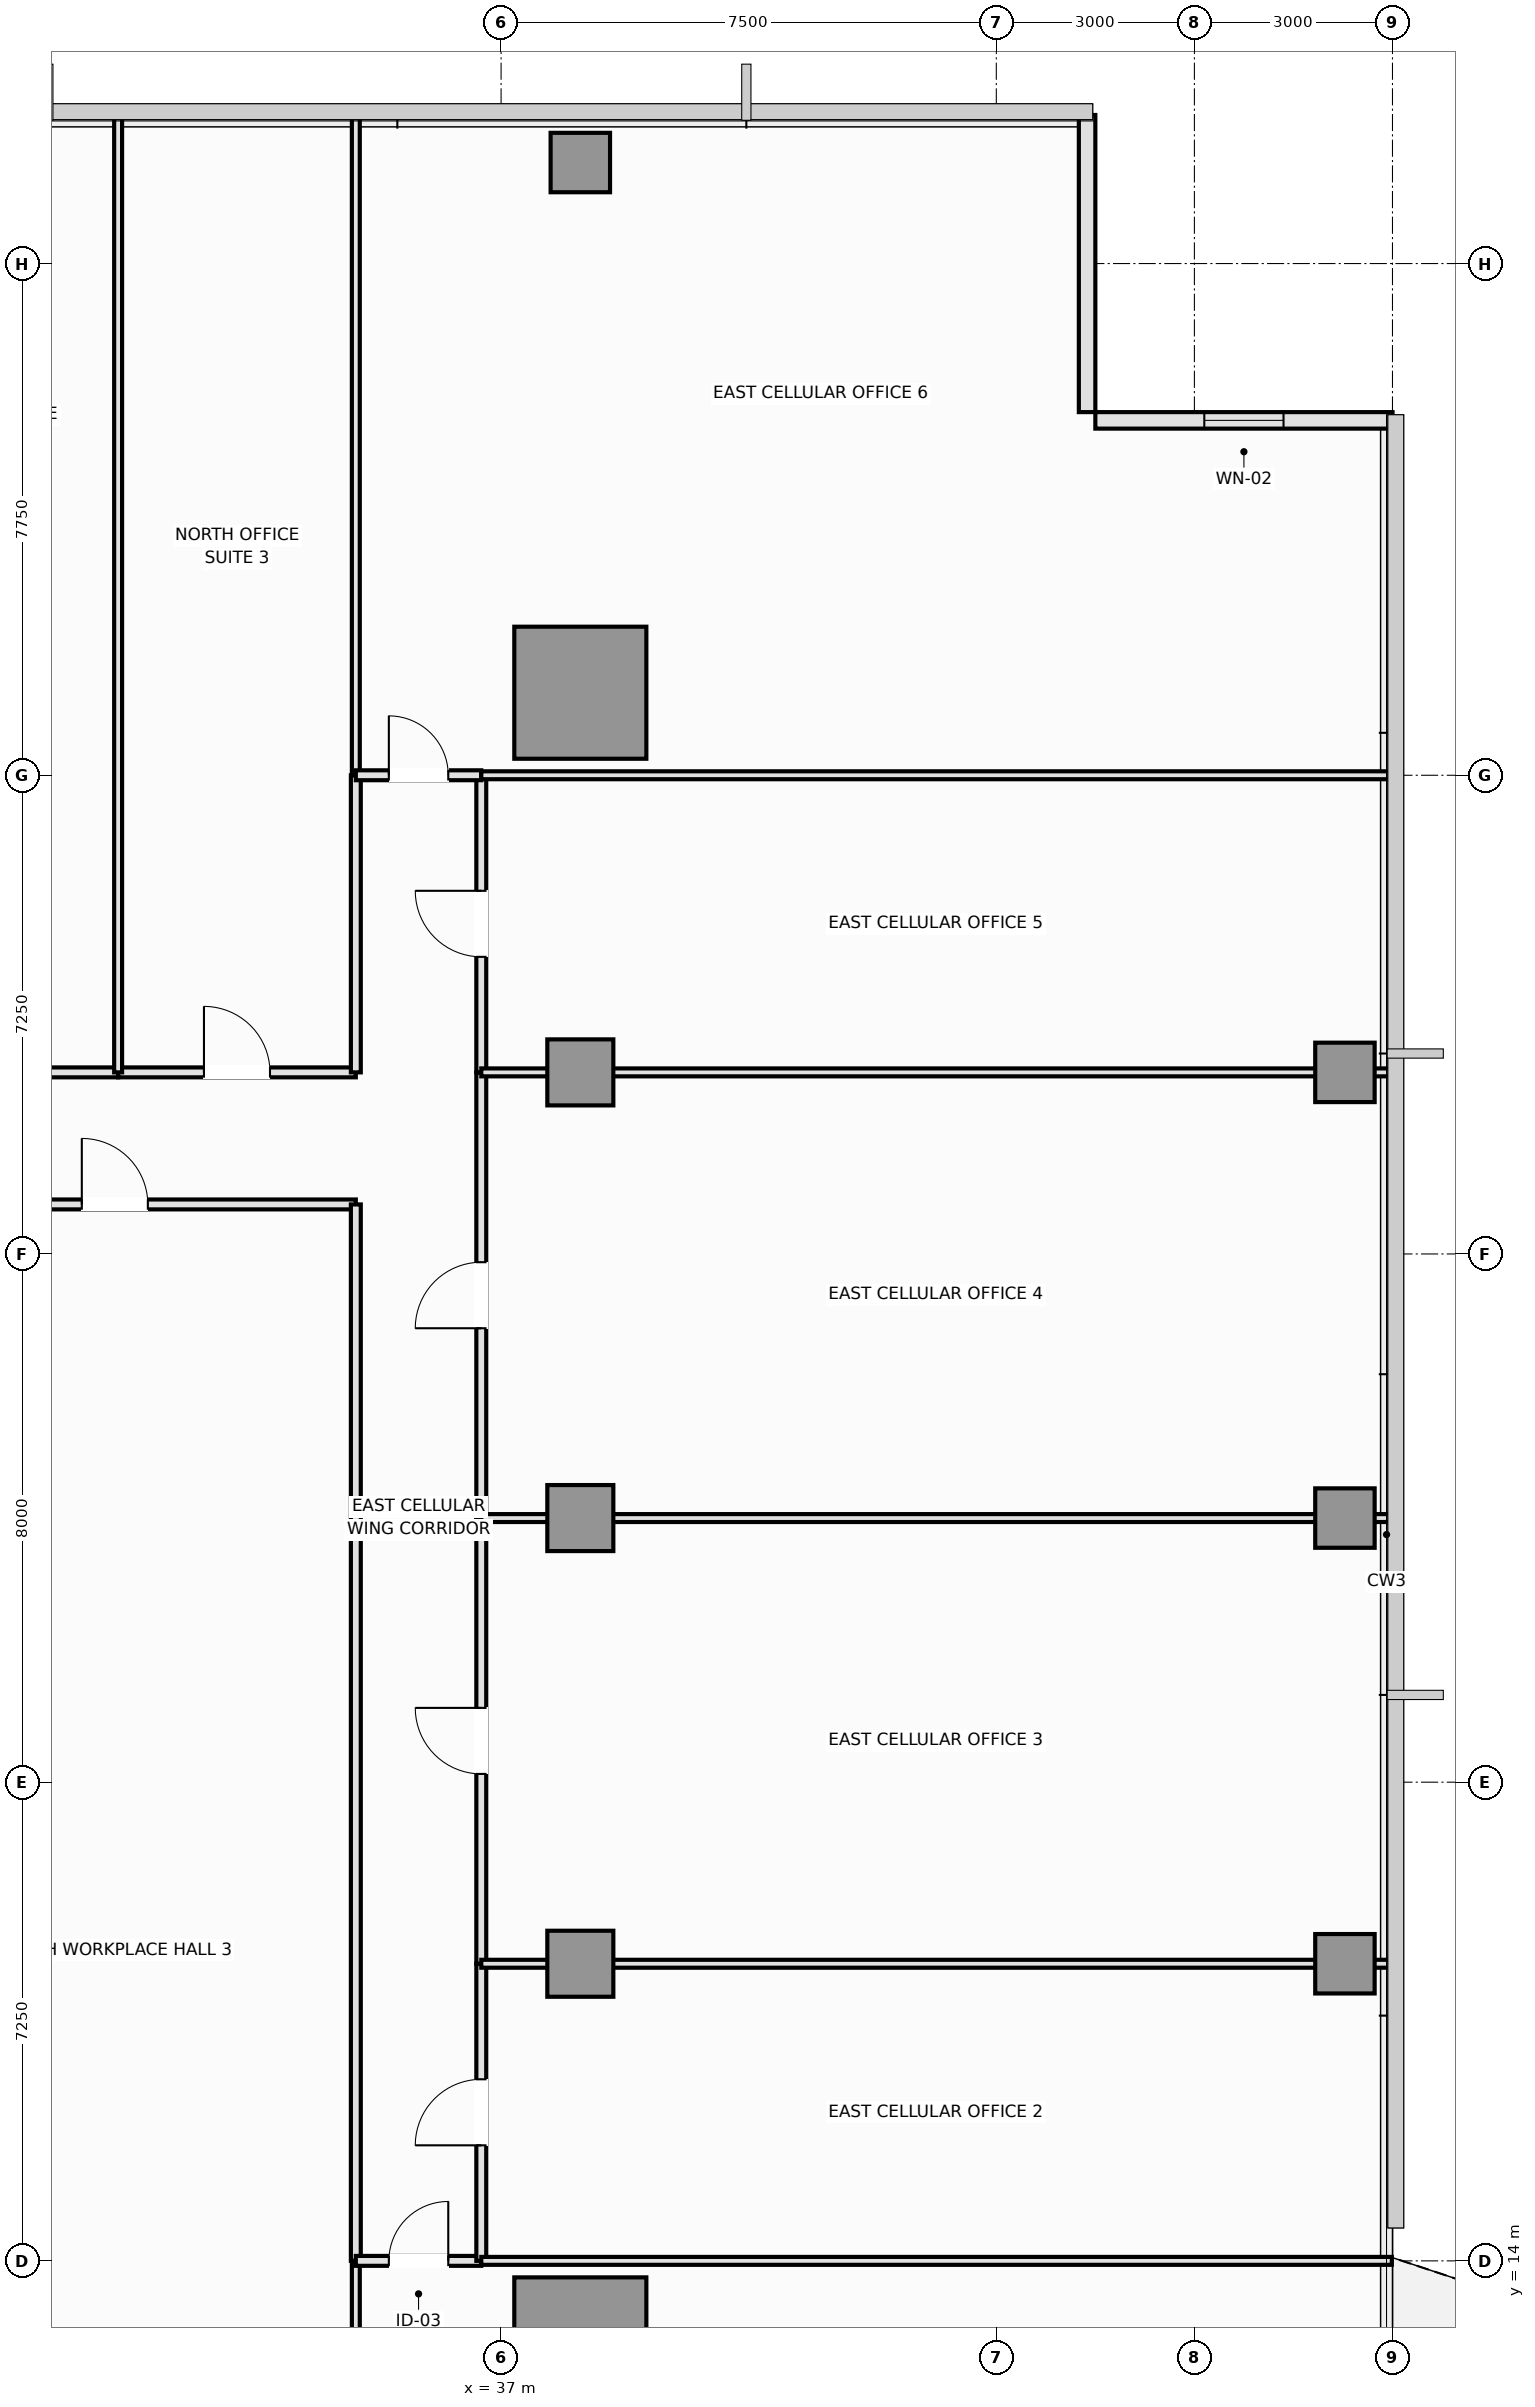
"""IFC4 building model, lengths in metres.
Left out: names, types, materials, properties, quantities, classifications, styles, units other than length and angle.
Written with IfcOpenShell. Run it as: python <this file> out.ifc"""

import sys

from ifc_helpers import new_model, si_unit, direction, frame, frame_2d, origin, origin_2d, place, context, subcontext, project, spatial, rectangle, extrude, element, fill, save


model = new_model("IFC4")
c1 = context("Model", 3, precision=1e-05, world=origin(), true_north=direction((0.0, 1.0)))
c2 = subcontext(c1, "Body", "Model", "MODEL_VIEW")
j1 = project(units=[si_unit("LENGTHUNIT", "METRE"), si_unit("PLANEANGLEUNIT", "RADIAN")], contexts=[c1])
p1 = place(None, origin())
s1 = spatial("IfcSite", under=j1, at=p1, CompositionType="ELEMENT")
p2 = place(p1, origin())
s2 = spatial("IfcBuilding", under=s1, at=p2, CompositionType="ELEMENT")
p3 = place(p2, frame((0.0, 0.0, 148.4)))
s3 = spatial("IfcBuildingStorey", under=s2, at=p3, CompositionType="ELEMENT", Elevation=148.4)
for number, where, z_axis, x_axis in (
    (1, (38.2, 12.75, 0.0), (0.0, 0.0, 1.0), (1.0, 0.0, 0.0)),
    (2, (38.2, 37.75, 0.0), (0.0, 0.0, 1.0), (1.0, 0.0, 0.0)),
):
    element("IfcColumn", number, at=place(p3, frame(where, z_axis=z_axis, x_axis=x_axis)), inside=s3, PredefinedType="COLUMN", context=c2, shape_type="SweptSolid", body=[
        extrude(rectangle(XDim=2.0, YDim=2.0, at=origin_2d()), origin(), (0.0, 0.0, 1.0), 3.55),
    ])
for number, where, z_axis, x_axis in (
    (3, (38.2, 18.5, 0.0), (0.0, 0.0, 1.0), (1.0, 0.0, 0.0)),
    (4, (38.2, 25.25, 0.0), (0.0, 0.0, 1.0), (1.0, 0.0, 0.0)),
    (5, (38.2, 32.0, 0.0), (0.0, 0.0, 1.0), (1.0, 0.0, 0.0)),
):
    element("IfcColumn", number, at=place(p3, frame(where, z_axis=z_axis, x_axis=x_axis)), inside=s3, PredefinedType="COLUMN", context=c2, shape_type="SweptSolid", body=[
        extrude(rectangle(XDim=1.0, YDim=1.0, at=origin_2d()), origin(), (0.0, 0.0, 1.0), 3.55),
    ])
for number, where, z_axis, x_axis in (
    (6, (49.78, 18.5, 0.0), (0.0, 0.0, 1.0), (1.0, 0.0, 0.0)),
    (7, (49.78, 25.25, 0.0), (0.0, 0.0, 1.0), (1.0, 0.0, 0.0)),
    (8, (49.78, 32.0, 0.0), (0.0, 0.0, 1.0), (1.0, 0.0, 0.0)),
    (9, (38.2, 45.78, 0.0), (0.0, 0.0, 1.0), (1.0, 0.0, 0.0)),
):
    element("IfcColumn", number, at=place(p3, frame(where, z_axis=z_axis, x_axis=x_axis)), inside=s3, PredefinedType="COLUMN", context=c2, shape_type="SweptSolid", body=[
        extrude(rectangle(XDim=0.9, YDim=0.9, at=origin_2d()), origin(), (0.0, 0.0, 1.0), 3.55),
    ])
p4 = place(p3, frame((50.5, 41.875, 0.0), z_axis=(0.0, 0.0, 1.0), x_axis=(-1.0, 0.0, 0.0)))
e10 = element("IfcWall", 10, at=p4, inside=s3, PredefinedType="SOLIDWALL", context=c2, shape_type="SweptSolid", body=[
    extrude(rectangle(XDim=4.5, YDim=0.25, at=frame_2d((2.25, 0.0))), origin(), (0.0, 0.0, 1.0), 3.37),
])
p5 = place(p4, frame((1.65, 0.0, 0.9)))
e11 = element("IfcOpeningElement", 11, at=p5, cuts=e10, PredefinedType="OPENING", context=c2, shape_type="SweptSolid", body=[
    extrude(rectangle(XDim=1.2, YDim=1.8, at=frame_2d((0.6, 0.9))), frame((0.0, 0.135, 0.0), z_axis=(0.0, -1.0, 0.0), x_axis=(1.0, 0.0, 0.0)), (0.0, 0.0, 1.0), 0.27),
])
p6 = place(p3, frame((45.875, 42.0, 0.0), z_axis=(0.0, 0.0, 1.0), x_axis=(0.0, 1.0, 0.0)))
e12 = element("IfcWall", 12, at=p6, inside=s3, PredefinedType="SOLIDWALL", context=c2, shape_type="SweptSolid", body=[
    extrude(rectangle(XDim=4.5, YDim=0.25, at=frame_2d((2.25, 0.0))), origin(), (0.0, 0.0, 1.0), 3.37),
])
p7 = place(p3, frame((27.5, 30.0, 0.0), z_axis=(0.0, 0.0, 1.0), x_axis=(1.0, 0.0, 0.0)))
e13 = element("IfcWall", 13, at=p7, inside=s3, PredefinedType="PARTITIONING", context=c2, shape_type="SweptSolid", body=[
    extrude(rectangle(XDim=7.3, YDim=0.15, at=frame_2d((3.65, 0.0))), origin(), (0.0, 0.0, 1.0), 3.37),
])
p8 = place(p7, frame((3.15, 0.0, 0.0)))
e14 = element("IfcOpeningElement", 14, at=p8, cuts=e13, PredefinedType="OPENING", context=c2, shape_type="SweptSolid", body=[
    extrude(rectangle(XDim=1.0, YDim=2.15, at=frame_2d((0.5, 1.075))), frame((0.0, 0.085, 0.0), z_axis=(0.0, -1.0, 0.0), x_axis=(1.0, 0.0, 0.0)), (0.0, 0.0, 1.0), 0.17),
])
p9 = place(p3, frame((27.5, 32.0, 0.0), z_axis=(0.0, 0.0, 1.0), x_axis=(1.0, 0.0, 0.0)))
e15 = element("IfcWall", 15, at=p9, inside=s3, PredefinedType="PARTITIONING", context=c2, shape_type="SweptSolid", body=[
    extrude(rectangle(XDim=3.7, YDim=0.15, at=frame_2d((1.85, 0.0))), origin(), (0.0, 0.0, 1.0), 2.77),
])
p10 = place(p9, frame((1.35, 0.0, 0.0)))
e16 = element("IfcOpeningElement", 16, at=p10, cuts=e15, PredefinedType="OPENING", context=c2, shape_type="SweptSolid", body=[
    extrude(rectangle(XDim=1.0, YDim=2.15, at=frame_2d((0.5, 1.075))), frame((0.0, 0.085, 0.0), z_axis=(0.0, -1.0, 0.0), x_axis=(1.0, 0.0, 0.0)), (0.0, 0.0, 1.0), 0.17),
])
p11 = place(p3, frame((31.2, 32.0, 0.0), z_axis=(0.0, 0.0, 1.0), x_axis=(1.0, 0.0, 0.0)))
e17 = element("IfcWall", 17, at=p11, inside=s3, PredefinedType="PARTITIONING", context=c2, shape_type="SweptSolid", body=[
    extrude(rectangle(XDim=3.6, YDim=0.15, at=frame_2d((1.8, 0.0))), origin(), (0.0, 0.0, 1.0), 2.77),
])
p12 = place(p11, frame((1.3, 0.0, 0.0)))
e18 = element("IfcOpeningElement", 18, at=p12, cuts=e17, PredefinedType="OPENING", context=c2, shape_type="SweptSolid", body=[
    extrude(rectangle(XDim=1.0, YDim=2.15, at=frame_2d((0.5, 1.075))), frame((0.0, 0.085, 0.0), z_axis=(0.0, -1.0, 0.0), x_axis=(1.0, 0.0, 0.0)), (0.0, 0.0, 1.0), 0.17),
])
p13 = place(p3, frame((34.8, 14.0, 0.0), z_axis=(0.0, 0.0, 1.0), x_axis=(0.0, 1.0, 0.0)))
e19 = element("IfcWall", 19, at=p13, inside=s3, PredefinedType="PARTITIONING", context=c2, shape_type="SweptSolid", body=[
    extrude(rectangle(XDim=16.0, YDim=0.15, at=frame_2d((8.0, 0.0))), origin(), (0.0, 0.0, 1.0), 3.37),
])
p14 = place(p3, frame((34.8, 3.51, 0.0), z_axis=(0.0, 0.0, 1.0), x_axis=(0.0, 1.0, 0.0)))
e20 = element("IfcWall", 20, at=p14, inside=s3, PredefinedType="PARTITIONING", context=c2, shape_type="SweptSolid", body=[
    extrude(rectangle(XDim=10.49, YDim=0.12, at=frame_2d((5.245, 0.0))), origin(), (0.0, 0.0, 1.0), 3.37),
])
p15 = place(p3, frame((31.2, 32.0, 0.0), z_axis=(0.0, 0.0, 1.0), x_axis=(0.0, 1.0, 0.0)))
e21 = element("IfcWall", 21, at=p15, inside=s3, PredefinedType="PARTITIONING", context=c2, shape_type="SweptSolid", body=[
    extrude(rectangle(XDim=14.49, YDim=0.12, at=frame_2d((7.245, 0.0))), origin(), (0.0, 0.0, 1.0), 3.37),
])
p16 = place(p3, frame((34.8, 32.0, 0.0), z_axis=(0.0, 0.0, 1.0), x_axis=(0.0, 1.0, 0.0)))
e22 = element("IfcWall", 22, at=p16, inside=s3, PredefinedType="PARTITIONING", context=c2, shape_type="SweptSolid", body=[
    extrude(rectangle(XDim=4.5, YDim=0.15, at=frame_2d((2.25, 0.0))), origin(), (0.0, 0.0, 1.0), 3.37),
])
p17 = place(p3, frame((34.8, 36.5, 0.0), z_axis=(0.0, 0.0, 1.0), x_axis=(0.0, 1.0, 0.0)))
e23 = element("IfcWall", 23, at=p17, inside=s3, PredefinedType="PARTITIONING", context=c2, shape_type="SweptSolid", body=[
    extrude(rectangle(XDim=9.99, YDim=0.12, at=frame_2d((4.995, 0.0))), origin(), (0.0, 0.0, 1.0), 3.37),
])
p18 = place(p3, frame((34.8, 14.0, 0.0), z_axis=(0.0, 0.0, 1.0), x_axis=(1.0, 0.0, 0.0)))
e24 = element("IfcWall", 24, at=p18, inside=s3, PredefinedType="PARTITIONING", context=c2, shape_type="SweptSolid", body=[
    extrude(rectangle(XDim=1.9, YDim=0.15, at=frame_2d((0.95, 0.0))), origin(), (0.0, 0.0, 1.0), 3.37),
])
p19 = place(p18, frame((0.5, 0.0, 0.0)))
e25 = element("IfcOpeningElement", 25, at=p19, cuts=e24, PredefinedType="OPENING", context=c2, shape_type="SweptSolid", body=[
    extrude(rectangle(XDim=0.9, YDim=2.1, at=frame_2d((0.45, 1.05))), frame((0.0, 0.085, 0.0), z_axis=(0.0, -1.0, 0.0), x_axis=(1.0, 0.0, 0.0)), (0.0, 0.0, 1.0), 0.17),
])
p20 = place(p3, frame((36.7, 14.0, 0.0), z_axis=(0.0, 0.0, 1.0), x_axis=(0.0, 1.0, 0.0)))
e26 = element("IfcWall", 26, at=p20, inside=s3, PredefinedType="PARTITIONING", context=c2, shape_type="SweptSolid", body=[
    extrude(rectangle(XDim=4.5, YDim=0.15, at=frame_2d((2.25, 0.0))), origin(), (0.0, 0.0, 1.0), 3.37),
])
p21 = place(p20, frame((1.75, 0.0, 0.0)))
e27 = element("IfcOpeningElement", 27, at=p21, cuts=e26, PredefinedType="OPENING", context=c2, shape_type="SweptSolid", body=[
    extrude(rectangle(XDim=1.0, YDim=2.15, at=frame_2d((0.5, 1.075))), frame((0.0, 0.085, 0.0), z_axis=(0.0, -1.0, 0.0), x_axis=(1.0, 0.0, 0.0)), (0.0, 0.0, 1.0), 0.17),
])
p22 = place(p3, frame((36.7, 18.5, 0.0), z_axis=(0.0, 0.0, 1.0), x_axis=(0.0, 1.0, 0.0)))
e28 = element("IfcWall", 28, at=p22, inside=s3, PredefinedType="PARTITIONING", context=c2, shape_type="SweptSolid", body=[
    extrude(rectangle(XDim=6.75, YDim=0.15, at=frame_2d((3.375, 0.0))), origin(), (0.0, 0.0, 1.0), 3.37),
])
p23 = place(p22, frame((2.875, 0.0, 0.0)))
e29 = element("IfcOpeningElement", 29, at=p23, cuts=e28, PredefinedType="OPENING", context=c2, shape_type="SweptSolid", body=[
    extrude(rectangle(XDim=1.0, YDim=2.15, at=frame_2d((0.5, 1.075))), frame((0.0, 0.085, 0.0), z_axis=(0.0, -1.0, 0.0), x_axis=(1.0, 0.0, 0.0)), (0.0, 0.0, 1.0), 0.17),
])
p24 = place(p3, frame((36.7, 25.25, 0.0), z_axis=(0.0, 0.0, 1.0), x_axis=(0.0, 1.0, 0.0)))
e30 = element("IfcWall", 30, at=p24, inside=s3, PredefinedType="PARTITIONING", context=c2, shape_type="SweptSolid", body=[
    extrude(rectangle(XDim=6.75, YDim=0.15, at=frame_2d((3.375, 0.0))), origin(), (0.0, 0.0, 1.0), 3.37),
])
p25 = place(p24, frame((2.875, 0.0, 0.0)))
e31 = element("IfcOpeningElement", 31, at=p25, cuts=e30, PredefinedType="OPENING", context=c2, shape_type="SweptSolid", body=[
    extrude(rectangle(XDim=1.0, YDim=2.15, at=frame_2d((0.5, 1.075))), frame((0.0, 0.085, 0.0), z_axis=(0.0, -1.0, 0.0), x_axis=(1.0, 0.0, 0.0)), (0.0, 0.0, 1.0), 0.17),
])
p26 = place(p3, frame((36.7, 32.0, 0.0), z_axis=(0.0, 0.0, 1.0), x_axis=(0.0, 1.0, 0.0)))
e32 = element("IfcWall", 32, at=p26, inside=s3, PredefinedType="PARTITIONING", context=c2, shape_type="SweptSolid", body=[
    extrude(rectangle(XDim=4.5, YDim=0.15, at=frame_2d((2.25, 0.0))), origin(), (0.0, 0.0, 1.0), 3.37),
])
p27 = place(p26, frame((1.75, 0.0, 0.0)))
e33 = element("IfcOpeningElement", 33, at=p27, cuts=e32, PredefinedType="OPENING", context=c2, shape_type="SweptSolid", body=[
    extrude(rectangle(XDim=1.0, YDim=2.15, at=frame_2d((0.5, 1.075))), frame((0.0, 0.085, 0.0), z_axis=(0.0, -1.0, 0.0), x_axis=(1.0, 0.0, 0.0)), (0.0, 0.0, 1.0), 0.17),
])
p28 = place(p3, frame((34.8, 36.5, 0.0), z_axis=(0.0, 0.0, 1.0), x_axis=(1.0, 0.0, 0.0)))
e34 = element("IfcWall", 34, at=p28, inside=s3, PredefinedType="PARTITIONING", context=c2, shape_type="SweptSolid", body=[
    extrude(rectangle(XDim=1.9, YDim=0.15, at=frame_2d((0.95, 0.0))), origin(), (0.0, 0.0, 1.0), 3.37),
])
p29 = place(p28, frame((0.5, 0.0, 0.0)))
e35 = element("IfcOpeningElement", 35, at=p29, cuts=e34, PredefinedType="OPENING", context=c2, shape_type="SweptSolid", body=[
    extrude(rectangle(XDim=0.9, YDim=2.1, at=frame_2d((0.45, 1.05))), frame((0.0, 0.085, 0.0), z_axis=(0.0, -1.0, 0.0), x_axis=(1.0, 0.0, 0.0)), (0.0, 0.0, 1.0), 0.17),
])
p30 = place(p3, frame((36.7, 14.0, 0.0), z_axis=(0.0, 0.0, 1.0), x_axis=(1.0, 0.0, 0.0)))
e36 = element("IfcWall", 36, at=p30, inside=s3, PredefinedType="PARTITIONING", context=c2, shape_type="SweptSolid", body=[
    extrude(rectangle(XDim=13.79, YDim=0.12, at=frame_2d((6.895, 0.0))), origin(), (0.0, 0.0, 1.0), 3.37),
])
for number, where, z_axis, x_axis in (
    (37, (36.7, 18.5, 0.0), (0.0, 0.0, 1.0), (1.0, 0.0, 0.0)),
    (38, (36.7, 25.25, 0.0), (0.0, 0.0, 1.0), (1.0, 0.0, 0.0)),
    (39, (36.7, 32.0, 0.0), (0.0, 0.0, 1.0), (1.0, 0.0, 0.0)),
):
    element("IfcWall", number, at=place(p3, frame(where, z_axis=z_axis, x_axis=x_axis)), inside=s3, PredefinedType="PARTITIONING", context=c2, shape_type="SweptSolid", body=[
        extrude(rectangle(XDim=13.79, YDim=0.12, at=frame_2d((6.895, 0.0))), origin(), (0.0, 0.0, 1.0), 2.77),
    ])
p31 = place(p3, frame((36.7, 36.5, 0.0), z_axis=(0.0, 0.0, 1.0), x_axis=(1.0, 0.0, 0.0)))
e40 = element("IfcWall", 40, at=p31, inside=s3, PredefinedType="PARTITIONING", context=c2, shape_type="SweptSolid", body=[
    extrude(rectangle(XDim=13.79, YDim=0.12, at=frame_2d((6.895, 0.0))), origin(), (0.0, 0.0, 1.0), 3.37),
])
p32 = place(p5, origin())
e41 = element("IfcWindow", 41, at=p32, inside=s3, PartitioningType="SINGLE_PANEL", PredefinedType="WINDOW", context=c2, shape_type="SweptSolid", body=[
    extrude(rectangle(XDim=1.2, YDim=1.8, at=frame_2d((0.6, 0.9))), frame((0.0, 0.03, 0.0), z_axis=(0.0, -1.0, 0.0), x_axis=(1.0, 0.0, 0.0)), (0.0, 0.0, 1.0), 0.06),
])
fill(e11, e41)
p33 = place(p8, origin())
e42 = element("IfcDoor", 42, at=p33, inside=s3, OperationType="SINGLE_SWING_LEFT", PredefinedType="DOOR", context=c2, shape_type="SweptSolid", body=[
    extrude(rectangle(XDim=1.0, YDim=2.15, at=frame_2d((0.5, 1.075))), frame((0.0, 0.025, 0.0), z_axis=(0.0, -1.0, 0.0), x_axis=(1.0, 0.0, 0.0)), (0.0, 0.0, 1.0), 0.05),
])
fill(e14, e42)
p34 = place(p12, origin())
e43 = element("IfcDoor", 43, at=p34, inside=s3, OperationType="SINGLE_SWING_LEFT", PredefinedType="DOOR", context=c2, shape_type="SweptSolid", body=[
    extrude(rectangle(XDim=1.0, YDim=2.15, at=frame_2d((0.5, 1.075))), frame((0.0, 0.025, 0.0), z_axis=(0.0, -1.0, 0.0), x_axis=(1.0, 0.0, 0.0)), (0.0, 0.0, 1.0), 0.05),
])
fill(e18, e43)
p35 = place(p19, origin())
e44 = element("IfcDoor", 44, at=p35, inside=s3, OperationType="SINGLE_SWING_RIGHT", PredefinedType="DOOR", context=c2, shape_type="SweptSolid", body=[
    extrude(rectangle(XDim=0.9, YDim=2.1, at=frame_2d((0.45, 1.05))), frame((0.0, 0.025, 0.0), z_axis=(0.0, -1.0, 0.0), x_axis=(1.0, 0.0, 0.0)), (0.0, 0.0, 1.0), 0.05),
])
fill(e25, e44)
p36 = place(p21, origin())
e45 = element("IfcDoor", 45, at=p36, inside=s3, OperationType="SINGLE_SWING_LEFT", PredefinedType="DOOR", context=c2, shape_type="SweptSolid", body=[
    extrude(rectangle(XDim=1.0, YDim=2.15, at=frame_2d((0.5, 1.075))), frame((0.0, 0.025, 0.0), z_axis=(0.0, -1.0, 0.0), x_axis=(1.0, 0.0, 0.0)), (0.0, 0.0, 1.0), 0.05),
])
fill(e27, e45)
p37 = place(p23, origin())
e46 = element("IfcDoor", 46, at=p37, inside=s3, OperationType="SINGLE_SWING_RIGHT", PredefinedType="DOOR", context=c2, shape_type="SweptSolid", body=[
    extrude(rectangle(XDim=1.0, YDim=2.15, at=frame_2d((0.5, 1.075))), frame((0.0, 0.025, 0.0), z_axis=(0.0, -1.0, 0.0), x_axis=(1.0, 0.0, 0.0)), (0.0, 0.0, 1.0), 0.05),
])
fill(e29, e46)
p38 = place(p25, origin())
e47 = element("IfcDoor", 47, at=p38, inside=s3, OperationType="SINGLE_SWING_LEFT", PredefinedType="DOOR", context=c2, shape_type="SweptSolid", body=[
    extrude(rectangle(XDim=1.0, YDim=2.15, at=frame_2d((0.5, 1.075))), frame((0.0, 0.025, 0.0), z_axis=(0.0, -1.0, 0.0), x_axis=(1.0, 0.0, 0.0)), (0.0, 0.0, 1.0), 0.05),
])
fill(e31, e47)
p39 = place(p27, origin())
e48 = element("IfcDoor", 48, at=p39, inside=s3, OperationType="SINGLE_SWING_RIGHT", PredefinedType="DOOR", context=c2, shape_type="SweptSolid", body=[
    extrude(rectangle(XDim=1.0, YDim=2.15, at=frame_2d((0.5, 1.075))), frame((0.0, 0.025, 0.0), z_axis=(0.0, -1.0, 0.0), x_axis=(1.0, 0.0, 0.0)), (0.0, 0.0, 1.0), 0.05),
])
fill(e33, e48)
p40 = place(p29, origin())
e49 = element("IfcDoor", 49, at=p40, inside=s3, OperationType="SINGLE_SWING_LEFT", PredefinedType="DOOR", context=c2, shape_type="SweptSolid", body=[
    extrude(rectangle(XDim=0.9, YDim=2.1, at=frame_2d((0.45, 1.05))), frame((0.0, 0.025, 0.0), z_axis=(0.0, -1.0, 0.0), x_axis=(1.0, 0.0, 0.0)), (0.0, 0.0, 1.0), 0.05),
])
fill(e35, e49)
save(model, sys.argv[1])
